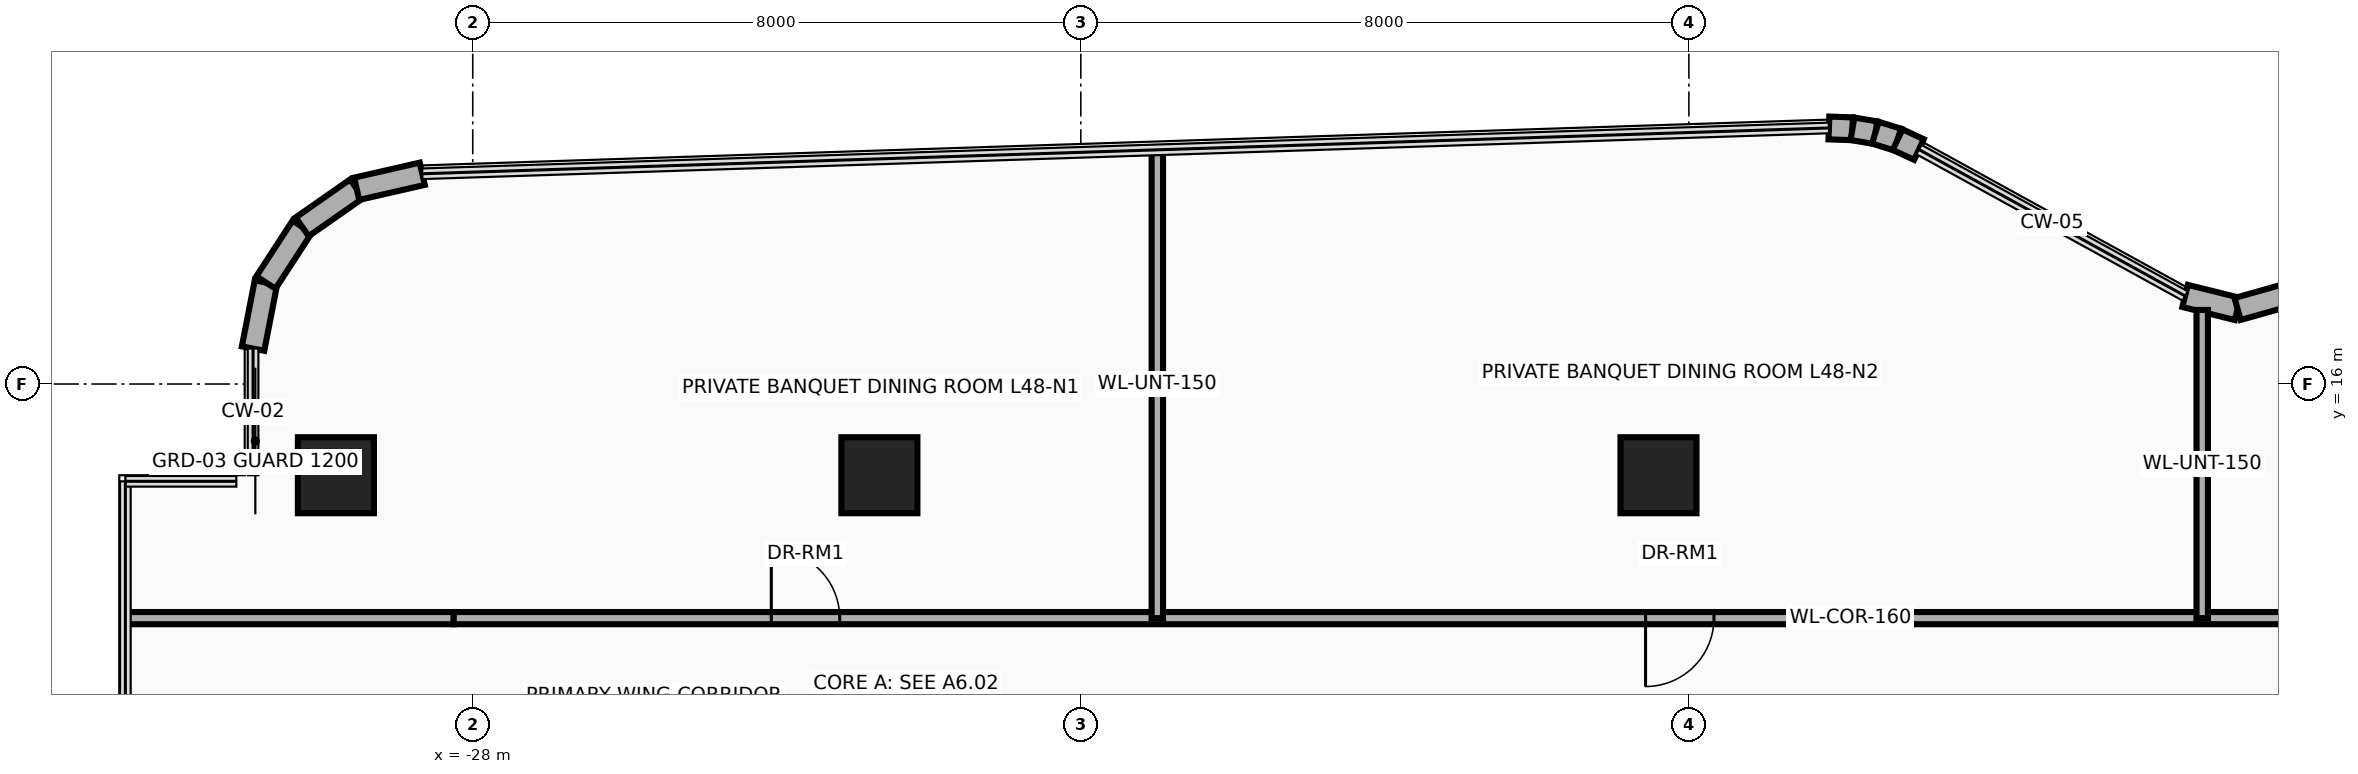
"""IFC4 building model, lengths in metres.
Left out: names, types, materials, properties, quantities, classifications, styles, units other than length and angle.
Written with IfcOpenShell. Run it as: python <this file> out.ifc"""

import sys

from ifc_helpers import new_model, si_unit, direction, frame, frame_2d, origin, origin_2d, place, context, subcontext, project, spatial, rectangle, extrude, source, transform, mapped, element, fill, save


model = new_model("IFC4")
c1 = context("Model", 3, precision=1e-05, world=origin(), true_north=direction((0.0, 1.0)))
c2 = subcontext(c1, "Body", "Model", "MODEL_VIEW")
j1 = project(units=[si_unit("LENGTHUNIT", "METRE"), si_unit("PLANEANGLEUNIT", "RADIAN")], contexts=[c1])
p1 = place(None, origin())
s1 = spatial("IfcSite", under=j1, at=p1, CompositionType="ELEMENT")
p2 = place(p1, origin())
s2 = spatial("IfcBuilding", under=s1, at=p2, CompositionType="ELEMENT")
p3 = place(p2, frame((0.0, 0.0, 188.4)))
s3 = spatial("IfcBuildingStorey", under=s2, at=p3, CompositionType="ELEMENT", Elevation=188.4)
m1 = source(origin(), c2, "Body", "SweptSolid", [
    extrude(rectangle(XDim=1.0, YDim=1.0, at=origin_2d()), origin(), (0.0, 0.0, 1.0), 3.95),
])
for number, where, z_axis, x_axis in (
    (1, (-29.8, 14.8, 0.0), (0.0, 0.0, 1.0), (1.0, 0.0, 0.0)),
    (2, (-22.65, 14.8, 0.0), (0.0, 0.0, 1.0), (1.0, 0.0, 0.0)),
    (3, (-12.4, 14.8, 0.0), (0.0, 0.0, 1.0), (1.0, 0.0, 0.0)),
):
    element("IfcColumn", number, at=place(p3, frame(where, z_axis=z_axis, x_axis=x_axis)), inside=s3, PredefinedType="COLUMN", context=c2, shape_type="MappedRepresentation", body=[
        mapped(m1, transform((0.0, 0.0, 0.0), x_axis=(1.0, 0.0, 0.0), y_axis=(0.0, 1.0, 0.0), z_axis=(0.0, 0.0, 1.0), scale=1.0)),
    ])
p4 = place(p3, frame((-30.89, 16.466, 0.0), z_axis=(0.0, 0.0, 1.0), x_axis=(0.191128020887, 0.981565117367, 0.0)))
e4 = element("IfcWall", 4, at=p4, inside=s3, PredefinedType="SOLIDWALL", context=c2, shape_type="SweptSolid", body=[
    extrude(rectangle(XDim=0.885, YDim=0.3, at=frame_2d((0.443, 0.0))), origin(), (0.0, 0.0, 1.0), 3.63),
])
p5 = place(p3, frame((-30.721, 17.335, 0.0), z_axis=(0.0, 0.0, 1.0), x_axis=(0.545322000684, 0.838226649284, 0.0)))
e5 = element("IfcWall", 5, at=p5, inside=s3, PredefinedType="SOLIDWALL", context=c2, shape_type="SweptSolid", body=[
    extrude(rectangle(XDim=0.874, YDim=0.3, at=frame_2d((0.437, 0.0))), origin(), (0.0, 0.0, 1.0), 3.63),
])
p6 = place(p3, frame((-30.244, 18.068, 0.0), z_axis=(0.0, 0.0, 1.0), x_axis=(0.820005059444, 0.572356272339, 0.0)))
e6 = element("IfcWall", 6, at=p6, inside=s3, PredefinedType="SOLIDWALL", context=c2, shape_type="SweptSolid", body=[
    extrude(rectangle(XDim=0.875, YDim=0.3, at=frame_2d((0.437, 0.0))), origin(), (0.0, 0.0, 1.0), 3.63),
])
p7 = place(p3, frame((-29.527, 18.569, 0.0), z_axis=(0.0, 0.0, 1.0), x_axis=(0.974798570829, 0.223086858218, 0.0)))
e7 = element("IfcWall", 7, at=p7, inside=s3, PredefinedType="SOLIDWALL", context=c2, shape_type="SweptSolid", body=[
    extrude(rectangle(XDim=0.885, YDim=0.3, at=frame_2d((0.443, 0.0))), origin(), (0.0, 0.0, 1.0), 3.63),
])
p8 = place(p3, frame((-10.158, 19.368, 0.0), z_axis=(0.0, 0.0, 1.0), x_axis=(0.999425494718, -0.03389218949, 0.0)))
e8 = element("IfcWall", 8, at=p8, inside=s3, PredefinedType="SOLIDWALL", context=c2, shape_type="SweptSolid", body=[
    extrude(rectangle(XDim=0.31, YDim=0.3, at=frame_2d((0.155, 0.0))), origin(), (0.0, 0.0, 1.0), 3.63),
])
for number, where, z_axis, x_axis in (
    (9, (-9.848, 19.358, 0.0), (0.0, 0.0, 1.0), (0.986, -0.167, 0.0)),
    (10, (-9.546, 19.307, 0.0), (0.0, 0.0, 1.0), (0.955, -0.297, 0.0)),
):
    element("IfcWall", number, at=place(p3, frame(where, z_axis=z_axis, x_axis=x_axis)), inside=s3, PredefinedType="SOLIDWALL", context=c2, shape_type="SweptSolid", body=[
        extrude(rectangle(XDim=0.306, YDim=0.3, at=frame_2d((0.153, 0.0))), origin(), (0.0, 0.0, 1.0), 3.63),
    ])
p9 = place(p3, frame((-9.254, 19.216, 0.0), z_axis=(0.0, 0.0, 1.0), x_axis=(0.906524902388, -0.42215234377, 0.0)))
e11 = element("IfcWall", 11, at=p9, inside=s3, PredefinedType="SOLIDWALL", context=c2, shape_type="SweptSolid", body=[
    extrude(rectangle(XDim=0.31, YDim=0.3, at=frame_2d((0.155, 0.0))), origin(), (0.0, 0.0, 1.0), 3.63),
])
p10 = place(p3, frame((-5.472, 17.159, 0.0), z_axis=(0.0, 0.0, 1.0), x_axis=(0.970564820059, -0.240840050789, 0.0)))
e12 = element("IfcWall", 12, at=p10, inside=s3, PredefinedType="SOLIDWALL", context=c2, shape_type="SweptSolid", body=[
    extrude(rectangle(XDim=0.712, YDim=0.3, at=frame_2d((0.356, 0.0))), origin(), (0.0, 0.0, 1.0), 3.63),
])
p11 = place(p3, frame((-4.781, 16.987, 0.0), z_axis=(0.0, 0.0, 1.0), x_axis=(0.962494705656, 0.271300463662, 0.0)))
e13 = element("IfcWall", 13, at=p11, inside=s3, PredefinedType="SOLIDWALL", context=c2, shape_type="SweptSolid", body=[
    extrude(rectangle(XDim=0.726, YDim=0.3, at=frame_2d((0.363, 0.0))), origin(), (0.0, 0.0, 1.0), 3.63),
])
p12 = place(p3, frame((-32.54, 12.92, 0.0), z_axis=(0.0, 0.0, 1.0), x_axis=(1.0, 0.0, 0.0)))
e14 = element("IfcWall", 14, at=p12, inside=s3, PredefinedType="PARTITIONING", context=c2, shape_type="SweptSolid", body=[
    extrude(rectangle(XDim=4.29, YDim=0.16, at=frame_2d((2.145, 0.0))), origin(), (0.0, 0.0, 1.0), 3.076),
])
p13 = place(p3, frame((-28.25, 12.92, 0.0), z_axis=(0.0, 0.0, 1.0), x_axis=(1.0, 0.0, 0.0)))
e15 = element("IfcWall", 15, at=p13, inside=s3, PredefinedType="PARTITIONING", context=c2, shape_type="SweptSolid", body=[
    extrude(rectangle(XDim=36.75, YDim=0.16, at=frame_2d((18.375, 0.0))), origin(), (0.0, 0.0, 1.0), 2.615),
])
p14 = place(p13, frame((4.178, 0.0, 0.0)))
e16 = element("IfcOpeningElement", 16, at=p14, cuts=e15, PredefinedType="OPENING", context=c2, shape_type="SweptSolid", body=[
    extrude(rectangle(XDim=0.9, YDim=2.1, at=frame_2d((0.45, 1.05))), frame((0.0, 0.095, 0.0), z_axis=(0.0, -1.0, 0.0), x_axis=(1.0, 0.0, 0.0)), (0.0, 0.0, 1.0), 0.19),
])
p15 = place(p13, frame((15.68, 0.0, 0.0)))
e17 = element("IfcOpeningElement", 17, at=p15, cuts=e15, PredefinedType="OPENING", context=c2, shape_type="SweptSolid", body=[
    extrude(rectangle(XDim=0.9, YDim=2.1, at=frame_2d((0.45, 1.05))), frame((0.0, 0.095, 0.0), z_axis=(0.0, -1.0, 0.0), x_axis=(1.0, 0.0, 0.0)), (0.0, 0.0, 1.0), 0.19),
])
p16 = place(p13, frame((29.427, 0.0, 0.0)))
e18 = element("IfcOpeningElement", 18, at=p16, cuts=e15, PredefinedType="OPENING", context=c2, shape_type="SweptSolid", body=[
    extrude(rectangle(XDim=0.9, YDim=2.1, at=frame_2d((0.45, 1.05))), frame((0.0, 0.095, 0.0), z_axis=(0.0, -1.0, 0.0), x_axis=(1.0, 0.0, 0.0)), (0.0, 0.0, 1.0), 0.19),
])
p17 = place(p3, frame((-18.993, 12.92, 0.0), z_axis=(0.0, 0.0, 1.0), x_axis=(0.0, 1.0, 0.0)))
e19 = element("IfcWall", 19, at=p17, inside=s3, PredefinedType="PARTITIONING", context=c2, shape_type="SweptSolid", body=[
    extrude(rectangle(XDim=6.161, YDim=0.15, at=frame_2d((3.081, 0.0))), origin(), (0.0, 0.0, 1.0), 2.665),
])
p18 = place(p3, frame((-5.247, 12.92, 0.0), z_axis=(0.0, 0.0, 1.0), x_axis=(0.0, 1.0, 0.0)))
e20 = element("IfcWall", 20, at=p18, inside=s3, PredefinedType="PARTITIONING", context=c2, shape_type="SweptSolid", body=[
    extrude(rectangle(XDim=4.054, YDim=0.15, at=frame_2d((2.027, 0.0))), origin(), (0.0, 0.0, 1.0), 2.415),
])
p19 = place(p14, origin())
e21 = element("IfcDoor", 21, at=p19, inside=s3, OperationType="SINGLE_SWING_RIGHT", PredefinedType="DOOR", context=c2, shape_type="SweptSolid", body=[
    extrude(rectangle(XDim=0.9, YDim=2.1, at=frame_2d((0.45, 1.05))), frame((0.0, 0.025, 0.0), z_axis=(0.0, -1.0, 0.0), x_axis=(1.0, 0.0, 0.0)), (0.0, 0.0, 1.0), 0.05),
])
fill(e16, e21)
p20 = place(p15, frame((0.9, 0.0, 0.0), z_axis=(0.0, 0.0, 1.0), x_axis=(-1.0, 0.0, 0.0)))
e22 = element("IfcDoor", 22, at=p20, inside=s3, OperationType="SINGLE_SWING_LEFT", PredefinedType="DOOR", context=c2, shape_type="SweptSolid", body=[
    extrude(rectangle(XDim=0.9, YDim=2.1, at=frame_2d((0.45, 1.05))), frame((0.0, 0.025, 0.0), z_axis=(0.0, -1.0, 0.0), x_axis=(1.0, 0.0, 0.0)), (0.0, 0.0, 1.0), 0.05),
])
fill(e17, e22)
save(model, sys.argv[1])
